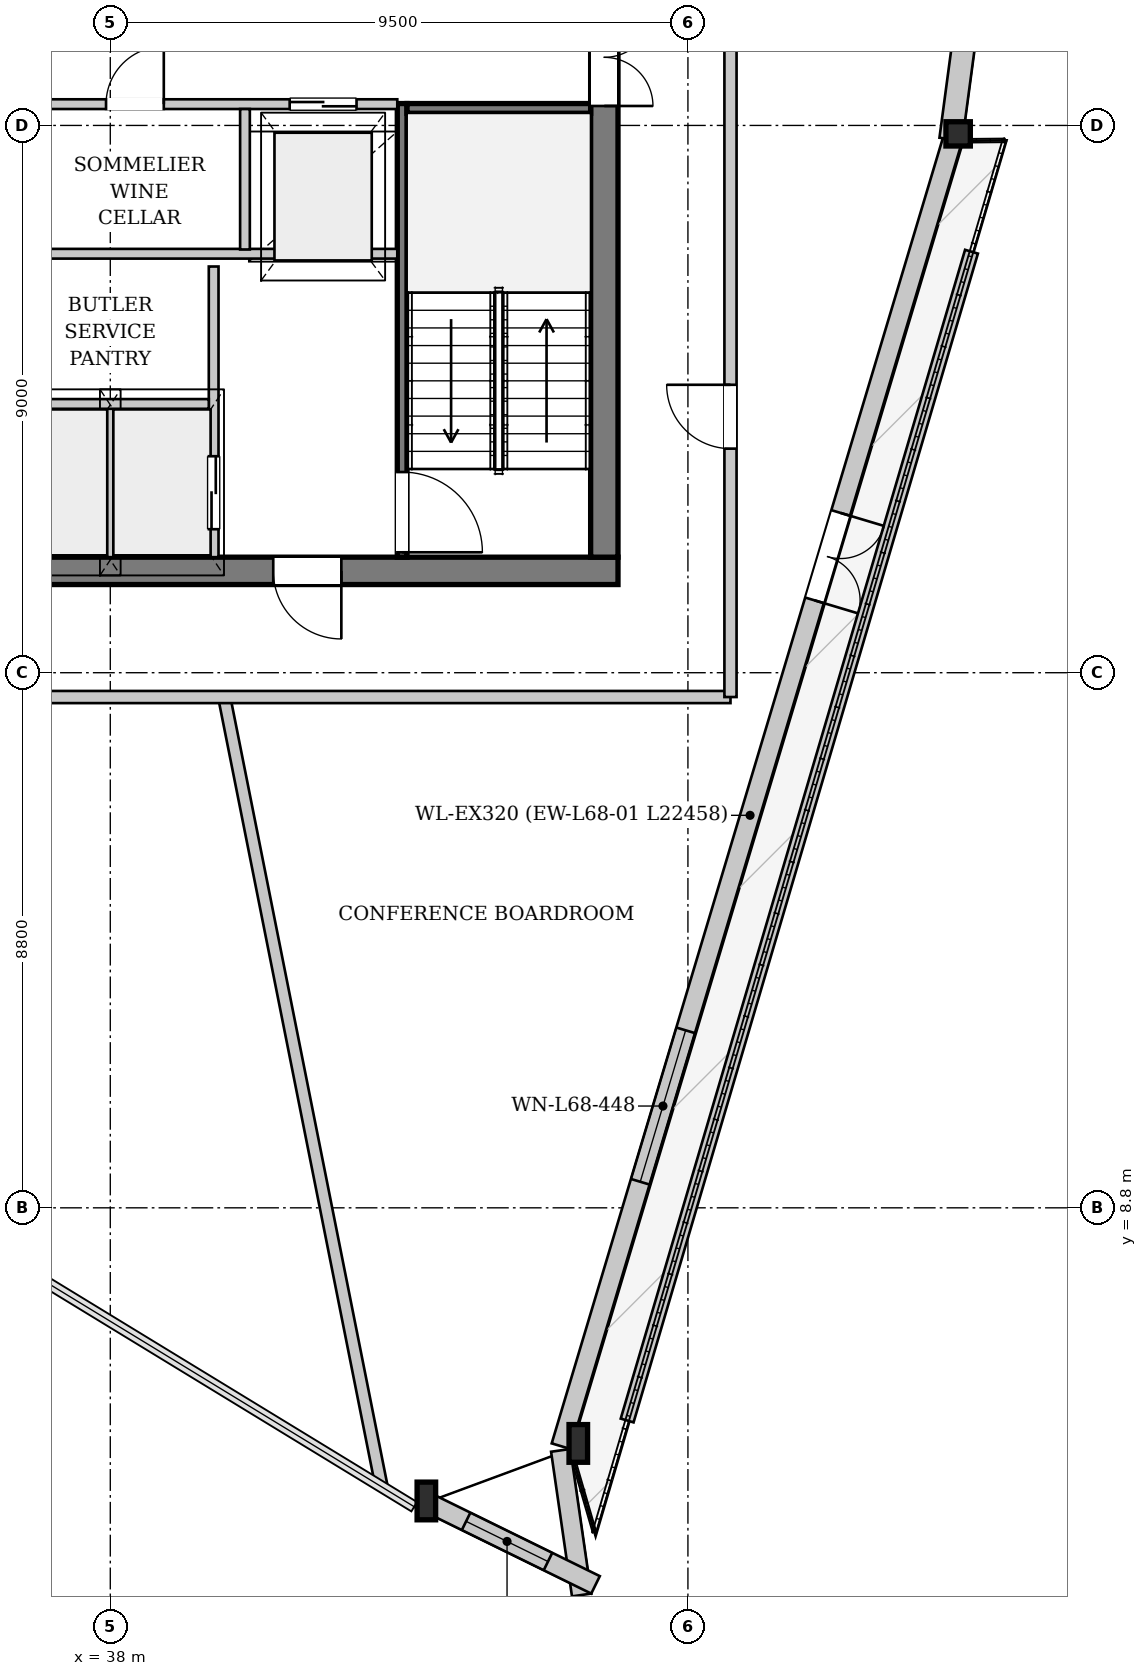
"""IFC4 building model, lengths in metres.
Left out: names, types, materials, properties, quantities, classifications, styles, units other than length and angle.
Written with IfcOpenShell. Run it as: python <this file> out.ifc"""

import sys

from ifc_helpers import new_model, si_unit, direction, frame, frame_2d, origin, origin_2d, place, context, subcontext, project, spatial, rectangle, i_section, extrude, source, transform, mapped, element, fill, save


model = new_model("IFC4")
c1 = context("Model", 3, precision=1e-05, world=origin(), true_north=direction((0.0, 1.0)))
c2 = subcontext(c1, "Body", "Model", "MODEL_VIEW")
j1 = project(units=[si_unit("LENGTHUNIT", "METRE"), si_unit("PLANEANGLEUNIT", "RADIAN")], contexts=[c1])
p1 = place(None, origin())
s1 = spatial("IfcSite", under=j1, at=p1, CompositionType="ELEMENT")
p2 = place(p1, origin())
s2 = spatial("IfcBuilding", under=s1, at=p2, CompositionType="ELEMENT")
p3 = place(p2, frame((0.0, 0.0, 256.1)))
s3 = spatial("IfcBuildingStorey", under=s2, at=p3, CompositionType="ELEMENT", Elevation=256.1)
m1 = source(origin(), c2, "Body", "SweptSolid", [
    extrude(i_section(OverallWidth=0.305, OverallDepth=0.62, WebThickness=0.021, FlangeThickness=0.04, at=origin_2d()), origin(), (0.0, 0.0, 1.0), 3.463),
])
p4 = place(p3, frame((42.999, 3.885, 0.0), z_axis=(0.115332752141, 0.054705510795, 0.991819370335), x_axis=(-0.428561087442, 0.903512808061, 0.0)))
e1 = element("IfcColumn", 1, at=p4, inside=s3, PredefinedType="COLUMN", context=c2, shape_type="MappedRepresentation", body=[
    mapped(m1, transform((0.0, 0.0, 0.0), x_axis=(1.0, 0.0, 0.0), y_axis=(0.0, 1.0, 0.0), z_axis=(0.0, 0.0, 1.0), scale=1.0)),
])
m2 = source(origin(), c2, "Body", "SweptSolid", [
    extrude(i_section(OverallWidth=0.305, OverallDepth=0.62, WebThickness=0.021, FlangeThickness=0.04, at=origin_2d()), origin(), (0.0, 0.0, 1.0), 3.449),
])
p5 = place(p3, frame((45.566, 4.834, 0.0), z_axis=(0.075869693214, 0.052797379793, 0.995718949472), x_axis=(-0.571199084565, 0.820811553155, 0.0)))
e2 = element("IfcColumn", 2, at=p5, inside=s3, PredefinedType="COLUMN", context=c2, shape_type="MappedRepresentation", body=[
    mapped(m2, transform((0.0, 0.0, 0.0), x_axis=(1.0, 0.0, 0.0), y_axis=(0.0, 1.0, 0.0), z_axis=(0.0, 0.0, 1.0), scale=1.0)),
])
m3 = source(origin(), c2, "Body", "SweptSolid", [
    extrude(i_section(OverallWidth=0.401, OverallDepth=0.399, WebThickness=0.022, FlangeThickness=0.034, at=origin_2d()), origin(), (0.0, 0.0, 1.0), 3.445),
])
p6 = place(p3, frame((52.013, 26.347, 0.0), z_axis=(-0.040322069797, 0.0661168561, 0.996996836518), x_axis=(-0.853756491358, -0.52067250116, 0.0)))
e3 = element("IfcColumn", 3, at=p6, inside=s3, PredefinedType="COLUMN", context=c2, shape_type="MappedRepresentation", body=[
    mapped(m3, transform((0.0, 0.0, 0.0), x_axis=(1.0, 0.0, 0.0), y_axis=(0.0, 1.0, 0.0), z_axis=(0.0, 0.0, 1.0), scale=1.0)),
])
p7 = place(p3, frame((51.86, 26.393, 0.0), z_axis=(0.0, 0.0, 1.0), x_axis=(-0.287077598684, -0.957907329721, 0.0)))
e4 = element("IfcWall", 4, at=p7, inside=s3, PredefinedType="SOLIDWALL", context=c2, shape_type="SweptSolid", body=[
    extrude(rectangle(XDim=22.458, YDim=0.32, at=frame_2d((11.229, 0.0))), origin(), (0.0, 0.0, 1.0), 2.872),
])
p8 = place(p7, frame((6.437, 0.0, 0.0)))
e5 = element("IfcOpeningElement", 5, at=p8, cuts=e4, PredefinedType="OPENING", context=c2, shape_type="SweptSolid", body=[
    extrude(rectangle(XDim=1.5, YDim=2.3, at=frame_2d((0.75, 1.15))), frame((0.0, 0.17, 0.0), z_axis=(0.0, -1.0, 0.0), x_axis=(1.0, 0.0, 0.0)), (0.0, 0.0, 1.0), 0.34),
])
p9 = place(p7, frame((15.319, 0.0, 0.402)))
e6 = element("IfcOpeningElement", 6, at=p9, cuts=e4, PredefinedType="OPENING", context=c2, shape_type="SweptSolid", body=[
    extrude(rectangle(XDim=2.6, YDim=2.35, at=frame_2d((1.3, 1.175))), frame((0.0, 0.17, 0.0), z_axis=(0.0, -1.0, 0.0), x_axis=(1.0, 0.0, 0.0)), (0.0, 0.0, 1.0), 0.34),
])
p10 = place(p3, frame((45.408, 4.812, 0.0), z_axis=(0.0, 0.0, 1.0), x_axis=(0.143042586775, -0.989716534351, 0.0)))
e7 = element("IfcWall", 7, at=p10, inside=s3, PredefinedType="SOLIDWALL", context=c2, shape_type="SweptSolid", body=[
    extrude(rectangle(XDim=2.403, YDim=0.32, at=frame_2d((1.202, 0.0))), origin(), (0.0, 0.0, 1.0), 2.872),
])
p11 = place(p3, frame((45.98, 2.6, 0.0), z_axis=(0.0, 0.0, 1.0), x_axis=(-0.897759640197, 0.440485673358, 0.0)))
e8 = element("IfcWall", 8, at=p11, inside=s3, PredefinedType="SOLIDWALL", context=c2, shape_type="SweptSolid", body=[
    extrude(rectangle(XDim=3.243, YDim=0.32, at=frame_2d((1.622, 0.0))), origin(), (0.0, 0.0, 1.0), 2.872),
])
p12 = place(p11, frame((0.871, 0.0, 0.452)))
e9 = element("IfcOpeningElement", 9, at=p12, cuts=e8, PredefinedType="OPENING", context=c2, shape_type="SweptSolid", body=[
    extrude(rectangle(XDim=1.5, YDim=2.3, at=frame_2d((0.75, 1.15))), frame((0.0, 0.17, 0.0), z_axis=(0.0, -1.0, 0.0), x_axis=(1.0, 0.0, 0.0)), (0.0, 0.0, 1.0), 0.34),
])
p13 = place(p3, frame((54.802, 48.633, 0.0), z_axis=(0.0, 0.0, 1.0), x_axis=(-0.132568870199, -0.991173796392, 0.0)))
e10 = element("IfcWall", 10, at=p13, inside=s3, PredefinedType="SOLIDWALL", context=c2, shape_type="SweptSolid", body=[
    extrude(rectangle(XDim=22.458, YDim=0.38, at=frame_2d((11.229, 0.0))), origin(), (0.0, 0.0, 1.0), 2.872),
])
p14 = place(p13, frame((5.188, 0.0, 0.502)))
e11 = element("IfcOpeningElement", 11, at=p14, cuts=e10, PredefinedType="OPENING", context=c2, shape_type="SweptSolid", body=[
    extrude(rectangle(XDim=2.2, YDim=2.25, at=frame_2d((1.1, 1.125))), frame((0.0, 0.2, 0.0), z_axis=(0.0, -1.0, 0.0), x_axis=(1.0, 0.0, 0.0)), (0.0, 0.0, 1.0), 0.4),
])
p15 = place(p13, frame((15.07, 0.0, 0.502)))
e12 = element("IfcOpeningElement", 12, at=p15, cuts=e10, PredefinedType="OPENING", context=c2, shape_type="SweptSolid", body=[
    extrude(rectangle(XDim=2.2, YDim=2.25, at=frame_2d((1.1, 1.125))), frame((0.0, 0.2, 0.0), z_axis=(0.0, -1.0, 0.0), x_axis=(1.0, 0.0, 0.0)), (0.0, 0.0, 1.0), 0.4),
])
p16 = place(p3, frame((46.5, 5.302, 0.0), z_axis=(0.0, 0.0, 1.0), x_axis=(0.282616163499, 0.959233081232, 0.0)))
e13 = element("IfcWall", 13, at=p16, inside=s3, PredefinedType="PARAPET", context=c2, shape_type="SweptSolid", body=[
    extrude(rectangle(XDim=20.038, YDim=0.22, at=frame_2d((10.019, 0.0))), origin(), (0.0, 0.0, 1.0), 0.3),
])
p17 = place(p3, frame((46.35, 19.275, 0.0), z_axis=(0.0, 0.0, 1.0), x_axis=(-1.0, 0.0, 0.0)))
e14 = element("IfcWall", 14, at=p17, inside=s3, PredefinedType="SHEAR", context=c2, shape_type="SweptSolid", body=[
    extrude(rectangle(XDim=16.7, YDim=0.45, at=frame_2d((8.35, 0.0))), origin(), (0.0, 0.0, 1.0), 3.38),
])
p18 = place(p17, frame((4.55, 0.0, 0.0)))
e15 = element("IfcOpeningElement", 15, at=p18, cuts=e14, PredefinedType="OPENING", context=c2, shape_type="SweptSolid", body=[
    extrude(rectangle(XDim=1.12, YDim=2.25, at=frame_2d((0.56, 1.125))), frame((0.0, 0.235, 0.0), z_axis=(0.0, -1.0, 0.0), x_axis=(1.0, 0.0, 0.0)), (0.0, 0.0, 1.0), 0.47),
])
p19 = place(p17, frame((11.05, 0.0, 0.0)))
e16 = element("IfcOpeningElement", 16, at=p19, cuts=e14, PredefinedType="OPENING", context=c2, shape_type="SweptSolid", body=[
    extrude(rectangle(XDim=1.12, YDim=2.25, at=frame_2d((0.56, 1.125))), frame((0.0, 0.235, 0.0), z_axis=(0.0, -1.0, 0.0), x_axis=(1.0, 0.0, 0.0)), (0.0, 0.0, 1.0), 0.47),
])
p20 = place(p3, frame((46.125, 33.7, 0.0), z_axis=(0.0, 0.0, 1.0), x_axis=(0.0, -1.0, 0.0)))
e17 = element("IfcWall", 17, at=p20, inside=s3, PredefinedType="SHEAR", context=c2, shape_type="SweptSolid", body=[
    extrude(rectangle(XDim=14.2, YDim=0.45, at=frame_2d((7.1, 0.0))), origin(), (0.0, 0.0, 1.0), 3.38),
])
p21 = place(p20, frame((5.18, 0.0, 0.0)))
e18 = element("IfcOpeningElement", 18, at=p21, cuts=e17, PredefinedType="OPENING", context=c2, shape_type="SweptSolid", body=[
    extrude(rectangle(XDim=1.6, YDim=2.2, at=frame_2d((0.8, 1.1))), frame((0.0, 0.235, 0.0), z_axis=(0.0, -1.0, 0.0), x_axis=(1.0, 0.0, 0.0)), (0.0, 0.0, 1.0), 0.47),
])
p22 = place(p20, frame((2.05, 0.0, 0.0)))
e19 = element("IfcOpeningElement", 19, at=p22, cuts=e17, PredefinedType="OPENING", context=c2, shape_type="SweptSolid", body=[
    extrude(rectangle(XDim=0.95, YDim=2.1, at=frame_2d((0.475, 1.05))), frame((0.0, 0.235, 0.0), z_axis=(0.0, -1.0, 0.0), x_axis=(1.0, 0.0, 0.0)), (0.0, 0.0, 1.0), 0.47),
])
p23 = place(p3, frame((42.8, 26.96, 0.0), z_axis=(0.0, 0.0, 1.0), x_axis=(0.0, -1.0, 0.0)))
e20 = element("IfcWall", 20, at=p23, inside=s3, PredefinedType="PARTITIONING", context=c2, shape_type="SweptSolid", body=[
    extrude(rectangle(XDim=7.46, YDim=0.16, at=frame_2d((3.73, 0.0))), origin(), (0.0, 0.0, 1.0), 3.38),
])
p24 = place(p23, frame((6.06, 0.0, 0.0)))
e21 = element("IfcOpeningElement", 21, at=p24, cuts=e20, PredefinedType="OPENING", context=c2, shape_type="SweptSolid", body=[
    extrude(rectangle(XDim=1.32, YDim=2.2, at=frame_2d((0.66, 1.1))), frame((0.0, 0.09, 0.0), z_axis=(0.0, -1.0, 0.0), x_axis=(1.0, 0.0, 0.0)), (0.0, 0.0, 1.0), 0.18),
])
p25 = place(p3, frame((42.88, 26.88, 0.0), z_axis=(0.0, 0.0, 1.0), x_axis=(1.0, 0.0, 0.0)))
e22 = element("IfcWall", 22, at=p25, inside=s3, PredefinedType="PARTITIONING", context=c2, shape_type="SweptSolid", body=[
    extrude(rectangle(XDim=3.02, YDim=0.16, at=frame_2d((1.51, 0.0))), origin(), (0.0, 0.0, 1.0), 3.38),
])
p26 = place(p3, frame((39.7, 24.28, 0.0), z_axis=(0.0, 0.0, 1.0), x_axis=(0.0, -1.0, 0.0)))
e23 = element("IfcWall", 23, at=p26, inside=s3, PredefinedType="PARTITIONING", context=c2, shape_type="SweptSolid", body=[
    extrude(rectangle(XDim=4.78, YDim=0.16, at=frame_2d((2.39, 0.0))), origin(), (0.0, 0.0, 1.0), 3.38),
])
p27 = place(p26, frame((3.12, 0.0, 0.0)))
e24 = element("IfcOpeningElement", 24, at=p27, cuts=e23, PredefinedType="OPENING", context=c2, shape_type="SweptSolid", body=[
    extrude(rectangle(XDim=1.2, YDim=2.2, at=frame_2d((0.6, 1.1))), frame((0.0, 0.09, 0.0), z_axis=(0.0, -1.0, 0.0), x_axis=(1.0, 0.0, 0.0)), (0.0, 0.0, 1.0), 0.18),
])
p28 = place(p3, frame((38.0, 19.5, 0.0), z_axis=(0.0, 0.0, 1.0), x_axis=(0.0, 1.0, 0.0)))
e25 = element("IfcWall", 25, at=p28, inside=s3, PredefinedType="PARTITIONING", context=c2, shape_type="SweptSolid", body=[
    extrude(rectangle(XDim=2.46, YDim=0.125, at=frame_2d((1.23, 0.0))), origin(), (0.0, 0.0, 1.0), 3.38),
])
p29 = place(p3, frame((36.38, 22.02, 0.0), z_axis=(0.0, 0.0, 1.0), x_axis=(1.0, 0.0, 0.0)))
e26 = element("IfcWall", 26, at=p29, inside=s3, PredefinedType="PARTITIONING", context=c2, shape_type="SweptSolid", body=[
    extrude(rectangle(XDim=3.24, YDim=0.16, at=frame_2d((1.62, 0.0))), origin(), (0.0, 0.0, 1.0), 3.38),
])
p30 = place(p3, frame((33.28, 24.49, 0.0), z_axis=(0.0, 0.0, 1.0), x_axis=(1.0, 0.0, 0.0)))
e27 = element("IfcWall", 27, at=p30, inside=s3, PredefinedType="PARTITIONING", context=c2, shape_type="SweptSolid", body=[
    extrude(rectangle(XDim=9.44, YDim=0.16, at=frame_2d((4.72, 0.0))), origin(), (0.0, 0.0, 1.0), 3.38),
])
p31 = place(p3, frame((33.28, 26.95, 0.0), z_axis=(0.0, 0.0, 1.0), x_axis=(1.0, 0.0, 0.0)))
e28 = element("IfcWall", 28, at=p31, inside=s3, PredefinedType="PARTITIONING", context=c2, shape_type="SweptSolid", body=[
    extrude(rectangle(XDim=9.44, YDim=0.16, at=frame_2d((4.72, 0.0))), origin(), (0.0, 0.0, 1.0), 3.38),
])
p32 = place(p31, frame((1.2, 0.0, 0.0)))
e29 = element("IfcOpeningElement", 29, at=p32, cuts=e28, PredefinedType="OPENING", context=c2, shape_type="SweptSolid", body=[
    extrude(rectangle(XDim=0.95, YDim=2.1, at=frame_2d((0.475, 1.05))), frame((0.0, 0.09, 0.0), z_axis=(0.0, -1.0, 0.0), x_axis=(1.0, 0.0, 0.0)), (0.0, 0.0, 1.0), 0.18),
])
p33 = place(p31, frame((4.65, 0.0, 0.0)))
e30 = element("IfcOpeningElement", 30, at=p33, cuts=e28, PredefinedType="OPENING", context=c2, shape_type="SweptSolid", body=[
    extrude(rectangle(XDim=0.95, YDim=2.1, at=frame_2d((0.475, 1.05))), frame((0.0, 0.09, 0.0), z_axis=(0.0, -1.0, 0.0), x_axis=(1.0, 0.0, 0.0)), (0.0, 0.0, 1.0), 0.18),
])
p34 = place(p31, frame((7.67, 0.0, 0.0)))
e31 = element("IfcOpeningElement", 31, at=p34, cuts=e28, PredefinedType="OPENING", context=c2, shape_type="SweptSolid", body=[
    extrude(rectangle(XDim=1.1, YDim=2.2, at=frame_2d((0.55, 1.1))), frame((0.0, 0.09, 0.0), z_axis=(0.0, -1.0, 0.0), x_axis=(1.0, 0.0, 0.0)), (0.0, 0.0, 1.0), 0.18),
])
p35 = place(p3, frame((40.215, 24.56, 0.0), z_axis=(0.0, 0.0, 1.0), x_axis=(0.0, 1.0, 0.0)))
e32 = element("IfcWall", 32, at=p35, inside=s3, PredefinedType="PARTITIONING", context=c2, shape_type="SweptSolid", body=[
    extrude(rectangle(XDim=2.31, YDim=0.16, at=frame_2d((1.155, 0.0))), origin(), (0.0, 0.0, 1.0), 3.38),
])
p36 = place(p3, frame((39.873, 17.2, 0.0), z_axis=(0.0, 0.0, 1.0), x_axis=(0.195475995278, -0.980708486386, 0.0)))
e33 = element("IfcWall", 33, at=p36, inside=s3, PredefinedType="PARTITIONING", context=c2, shape_type="SweptSolid", body=[
    extrude(rectangle(XDim=13.203, YDim=0.2, at=frame_2d((6.601, 0.0))), origin(), (0.0, 0.0, 1.0), 3.38),
])
p37 = place(p3, frame((27.8, 17.2, 0.0), z_axis=(0.0, 0.0, 1.0), x_axis=(1.0, 0.0, 0.0)))
e34 = element("IfcWall", 34, at=p37, inside=s3, PredefinedType="PARTITIONING", context=c2, shape_type="SweptSolid", body=[
    extrude(rectangle(XDim=20.4, YDim=0.2, at=frame_2d((10.2, 0.0))), origin(), (0.0, 0.0, 1.0), 3.38),
])
p38 = place(p37, frame((0.3, 0.0, 0.0)))
e35 = element("IfcOpeningElement", 35, at=p38, cuts=e34, PredefinedType="OPENING", context=c2, shape_type="SweptSolid", body=[
    extrude(rectangle(XDim=1.05, YDim=2.2, at=frame_2d((0.525, 1.1))), frame((0.0, 0.11, 0.0), z_axis=(0.0, -1.0, 0.0), x_axis=(1.0, 0.0, 0.0)), (0.0, 0.0, 1.0), 0.22),
])
p39 = place(p3, frame((48.2, 17.2, 0.0), z_axis=(0.0, 0.0, 1.0), x_axis=(0.0, 1.0, 0.0)))
e36 = element("IfcWall", 36, at=p39, inside=s3, PredefinedType="PARTITIONING", context=c2, shape_type="SweptSolid", body=[
    extrude(rectangle(XDim=18.8, YDim=0.2, at=frame_2d((9.4, 0.0))), origin(), (0.0, 0.0, 1.0), 3.065),
])
p40 = place(p39, frame((4.085, 0.0, 0.0)))
e37 = element("IfcOpeningElement", 37, at=p40, cuts=e36, PredefinedType="OPENING", context=c2, shape_type="SweptSolid", body=[
    extrude(rectangle(XDim=1.05, YDim=2.2, at=frame_2d((0.525, 1.1))), frame((0.0, 0.11, 0.0), z_axis=(0.0, -1.0, 0.0), x_axis=(1.0, 0.0, 0.0)), (0.0, 0.0, 1.0), 0.22),
])
m4 = source(origin(), c2, "Body", "SweptSolid", [
    extrude(rectangle(XDim=1.5, YDim=2.3, at=frame_2d((0.75, 1.15))), frame((0.0, 0.025, 0.0), z_axis=(0.0, -1.0, 0.0), x_axis=(1.0, 0.0, 0.0)), (0.0, 0.0, 1.0), 0.05),
])
p41 = place(p8, origin())
e38 = element("IfcDoor", 38, at=p41, inside=s3, OperationType="DOUBLE_DOOR_SINGLE_SWING", PredefinedType="DOOR", context=c2, shape_type="MappedRepresentation", body=[
    mapped(m4, transform((0.0, 0.0, 0.0), x_axis=(1.0, 0.0, 0.0), y_axis=(0.0, 1.0, 0.0), z_axis=(0.0, 0.0, 1.0), scale=1.0)),
])
fill(e5, e38)
m5 = source(origin(), c2, "Body", "SweptSolid", [
    extrude(rectangle(XDim=2.6, YDim=2.35, at=frame_2d((1.3, 1.175))), frame((0.0, 0.03, 0.0), z_axis=(0.0, -1.0, 0.0), x_axis=(1.0, 0.0, 0.0)), (0.0, 0.0, 1.0), 0.06),
])
p42 = place(p9, origin())
e39 = element("IfcWindow", 39, at=p42, inside=s3, PartitioningType="SINGLE_PANEL", PredefinedType="WINDOW", context=c2, shape_type="MappedRepresentation", body=[
    mapped(m5, transform((0.0, 0.0, 0.0), x_axis=(1.0, 0.0, 0.0), y_axis=(0.0, 1.0, 0.0), z_axis=(0.0, 0.0, 1.0), scale=1.0)),
])
fill(e6, e39)
m6 = source(origin(), c2, "Body", "SweptSolid", [
    extrude(rectangle(XDim=1.5, YDim=2.3, at=frame_2d((0.75, 1.15))), frame((0.0, 0.03, 0.0), z_axis=(0.0, -1.0, 0.0), x_axis=(1.0, 0.0, 0.0)), (0.0, 0.0, 1.0), 0.06),
])
p43 = place(p12, origin())
e40 = element("IfcWindow", 40, at=p43, inside=s3, PartitioningType="SINGLE_PANEL", PredefinedType="WINDOW", context=c2, shape_type="MappedRepresentation", body=[
    mapped(m6, transform((0.0, 0.0, 0.0), x_axis=(1.0, 0.0, 0.0), y_axis=(0.0, 1.0, 0.0), z_axis=(0.0, 0.0, 1.0), scale=1.0)),
])
fill(e9, e40)
m7 = source(origin(), c2, "Body", "SweptSolid", [
    extrude(rectangle(XDim=1.12, YDim=2.25, at=frame_2d((0.56, 1.125))), frame((0.0, 0.025, 0.0), z_axis=(0.0, -1.0, 0.0), x_axis=(1.0, 0.0, 0.0)), (0.0, 0.0, 1.0), 0.05),
])
p44 = place(p18, origin())
e41 = element("IfcDoor", 41, at=p44, inside=s3, OperationType="SINGLE_SWING_LEFT", PredefinedType="DOOR", context=c2, shape_type="MappedRepresentation", body=[
    mapped(m7, transform((0.0, 0.0, 0.0), x_axis=(1.0, 0.0, 0.0), y_axis=(0.0, 1.0, 0.0), z_axis=(0.0, 0.0, 1.0), scale=1.0)),
])
fill(e15, e41)
m8 = source(origin(), c2, "Body", "SweptSolid", [
    extrude(rectangle(XDim=1.6, YDim=2.2, at=frame_2d((0.8, 1.1))), frame((0.0, 0.025, 0.0), z_axis=(0.0, -1.0, 0.0), x_axis=(1.0, 0.0, 0.0)), (0.0, 0.0, 1.0), 0.05),
])
p45 = place(p21, origin())
e42 = element("IfcDoor", 42, at=p45, inside=s3, OperationType="DOUBLE_DOOR_SINGLE_SWING", PredefinedType="DOOR", context=c2, shape_type="MappedRepresentation", body=[
    mapped(m8, transform((0.0, 0.0, 0.0), x_axis=(1.0, 0.0, 0.0), y_axis=(0.0, 1.0, 0.0), z_axis=(0.0, 0.0, 1.0), scale=1.0)),
])
fill(e18, e42)
m9 = source(origin(), c2, "Body", "SweptSolid", [
    extrude(rectangle(XDim=1.32, YDim=2.2, at=frame_2d((0.66, 1.1))), frame((0.0, 0.025, 0.0), z_axis=(0.0, -1.0, 0.0), x_axis=(1.0, 0.0, 0.0)), (0.0, 0.0, 1.0), 0.05),
])
p46 = place(p24, origin())
e43 = element("IfcDoor", 43, at=p46, inside=s3, OperationType="SINGLE_SWING_RIGHT", PredefinedType="DOOR", context=c2, shape_type="MappedRepresentation", body=[
    mapped(m9, transform((0.0, 0.0, 0.0), x_axis=(1.0, 0.0, 0.0), y_axis=(0.0, 1.0, 0.0), z_axis=(0.0, 0.0, 1.0), scale=1.0)),
])
fill(e21, e43)
m10 = source(origin(), c2, "Body", "SweptSolid", [
    extrude(rectangle(XDim=1.2, YDim=2.2, at=frame_2d((0.6, 1.1))), frame((0.0, 0.025, 0.0), z_axis=(0.0, -1.0, 0.0), x_axis=(1.0, 0.0, 0.0)), (0.0, 0.0, 1.0), 0.05),
])
p47 = place(p27, origin())
e44 = element("IfcDoor", 44, at=p47, inside=s3, OperationType="DOUBLE_DOOR_SLIDING", PredefinedType="DOOR", context=c2, shape_type="MappedRepresentation", body=[
    mapped(m10, transform((0.0, 0.0, 0.0), x_axis=(1.0, 0.0, 0.0), y_axis=(0.0, 1.0, 0.0), z_axis=(0.0, 0.0, 1.0), scale=1.0)),
])
fill(e24, e44)
m11 = source(origin(), c2, "Body", "SweptSolid", [
    extrude(rectangle(XDim=0.95, YDim=2.1, at=frame_2d((0.475, 1.05))), frame((0.0, 0.025, 0.0), z_axis=(0.0, -1.0, 0.0), x_axis=(1.0, 0.0, 0.0)), (0.0, 0.0, 1.0), 0.05),
])
p48 = place(p33, origin())
e45 = element("IfcDoor", 45, at=p48, inside=s3, OperationType="SINGLE_SWING_RIGHT", PredefinedType="DOOR", context=c2, shape_type="MappedRepresentation", body=[
    mapped(m11, transform((0.0, 0.0, 0.0), x_axis=(1.0, 0.0, 0.0), y_axis=(0.0, 1.0, 0.0), z_axis=(0.0, 0.0, 1.0), scale=1.0)),
])
fill(e30, e45)
m12 = source(origin(), c2, "Body", "SweptSolid", [
    extrude(rectangle(XDim=1.1, YDim=2.2, at=frame_2d((0.55, 1.1))), frame((0.0, 0.025, 0.0), z_axis=(0.0, -1.0, 0.0), x_axis=(1.0, 0.0, 0.0)), (0.0, 0.0, 1.0), 0.05),
])
p49 = place(p34, origin())
e46 = element("IfcDoor", 46, at=p49, inside=s3, OperationType="DOUBLE_DOOR_SLIDING", PredefinedType="DOOR", context=c2, shape_type="MappedRepresentation", body=[
    mapped(m12, transform((0.0, 0.0, 0.0), x_axis=(1.0, 0.0, 0.0), y_axis=(0.0, 1.0, 0.0), z_axis=(0.0, 0.0, 1.0), scale=1.0)),
])
fill(e31, e46)
m13 = source(origin(), c2, "Body", "SweptSolid", [
    extrude(rectangle(XDim=1.05, YDim=2.2, at=frame_2d((0.525, 1.1))), frame((0.0, 0.025, 0.0), z_axis=(0.0, -1.0, 0.0), x_axis=(1.0, 0.0, 0.0)), (0.0, 0.0, 1.0), 0.05),
])
p50 = place(p40, origin())
e47 = element("IfcDoor", 47, at=p50, inside=s3, OperationType="SINGLE_SWING_RIGHT", PredefinedType="DOOR", context=c2, shape_type="MappedRepresentation", body=[
    mapped(m13, transform((0.0, 0.0, 0.0), x_axis=(1.0, 0.0, 0.0), y_axis=(0.0, 1.0, 0.0), z_axis=(0.0, 0.0, 1.0), scale=1.0)),
])
fill(e37, e47)
save(model, sys.argv[1])
